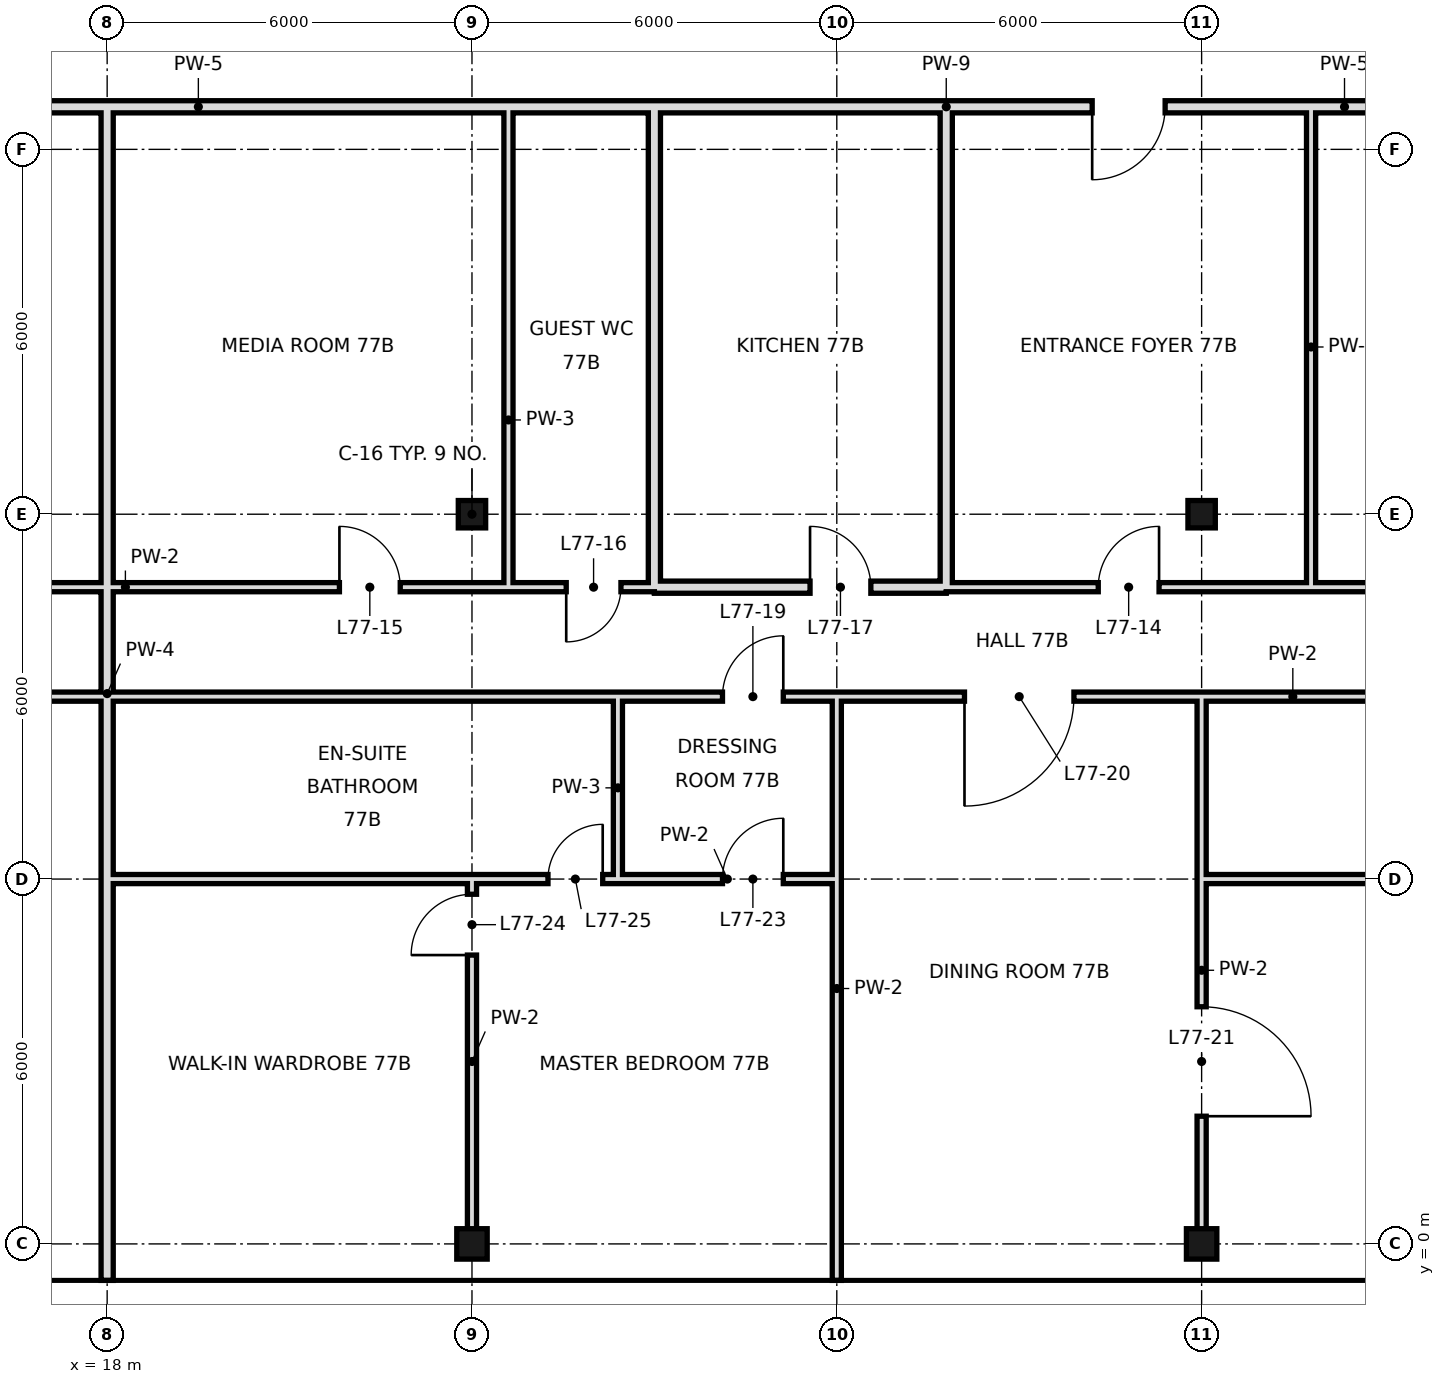
"""IFC4 building model, lengths in metres.
Left out: names, types, materials, properties, quantities, classifications, styles, units other than length and angle.
Written with IfcOpenShell. Run it as: python <this file> out.ifc"""

import sys

from ifc_helpers import new_model, si_unit, direction, frame, frame_2d, origin, origin_2d, place, context, subcontext, project, spatial, rectangle, hollow_rectangle, extrude, element, fill, save


model = new_model("IFC4")
c1 = context("Model", 3, precision=1e-05, world=origin(), true_north=direction((0.0, 1.0)))
c2 = subcontext(c1, "Body", "Model", "MODEL_VIEW")
j1 = project(units=[si_unit("LENGTHUNIT", "METRE"), si_unit("PLANEANGLEUNIT", "RADIAN")], contexts=[c1])
p1 = place(None, origin())
s1 = spatial("IfcSite", under=j1, at=p1, CompositionType="ELEMENT")
p2 = place(p1, origin())
s2 = spatial("IfcBuilding", under=s1, at=p2, CompositionType="ELEMENT")
p3 = place(p2, frame((0.0, 0.0, 323.2)))
s3 = spatial("IfcBuildingStorey", under=s2, at=p3, CompositionType="ELEMENT", Elevation=323.2)
p4 = place(p3, frame((24.0, 0.0, 0.0), z_axis=(0.0, 0.0, 1.0), x_axis=(1.0, 0.0, 0.0)))
e1 = element("IfcColumn", 1, at=p4, inside=s3, PredefinedType="COLUMN", context=c2, shape_type="SweptSolid", body=[
    extrude(hollow_rectangle(XDim=0.5, YDim=0.5, WallThickness=0.025, at=origin_2d()), origin(), (0.0, 0.0, 1.0), 3.6),
])
p5 = place(p3, frame((24.0, 12.0, 0.0), z_axis=(0.0, 0.0, 1.0), x_axis=(1.0, 0.0, 0.0)))
e2 = element("IfcColumn", 2, at=p5, inside=s3, PredefinedType="COLUMN", context=c2, shape_type="SweptSolid", body=[
    extrude(hollow_rectangle(XDim=0.45, YDim=0.45, WallThickness=0.022, at=origin_2d()), origin(), (0.0, 0.0, 1.0), 3.6),
])
p6 = place(p3, frame((36.0, 0.0, 0.0), z_axis=(0.0, 0.0, 1.0), x_axis=(1.0, 0.0, 0.0)))
e3 = element("IfcColumn", 3, at=p6, inside=s3, PredefinedType="COLUMN", context=c2, shape_type="SweptSolid", body=[
    extrude(hollow_rectangle(XDim=0.5, YDim=0.5, WallThickness=0.025, at=origin_2d()), origin(), (0.0, 0.0, 1.0), 3.6),
])
p7 = place(p3, frame((36.0, 12.0, 0.0), z_axis=(0.0, 0.0, 1.0), x_axis=(1.0, 0.0, 0.0)))
e4 = element("IfcColumn", 4, at=p7, inside=s3, PredefinedType="COLUMN", context=c2, shape_type="SweptSolid", body=[
    extrude(hollow_rectangle(XDim=0.45, YDim=0.45, WallThickness=0.022, at=origin_2d()), origin(), (0.0, 0.0, 1.0), 3.6),
])
p8 = place(p3, frame((18.0, -0.6, 0.0), z_axis=(0.0, 0.0, 1.0), x_axis=(0.0, 1.0, 0.0)))
e5 = element("IfcWall", 5, at=p8, inside=s3, PredefinedType="SOLIDWALL", context=c2, shape_type="SweptSolid", body=[
    extrude(rectangle(XDim=19.3, YDim=0.2, at=frame_2d((9.65, 0.0))), origin(), (0.0, 0.0, 1.0), 2.72),
])
p9 = place(p3, frame((24.0, 0.0, 0.0), z_axis=(0.0, 0.0, 1.0), x_axis=(0.0, 1.0, 0.0)))
e6 = element("IfcWall", 6, at=p9, inside=s3, PredefinedType="PARTITIONING", context=c2, shape_type="SweptSolid", body=[
    extrude(rectangle(XDim=6.0, YDim=0.15, at=frame_2d((3.0, 0.0))), origin(), (0.0, 0.0, 1.0), 2.72),
])
p10 = place(p9, frame((4.75, 0.0, 0.0)))
e7 = element("IfcOpeningElement", 7, at=p10, cuts=e6, PredefinedType="OPENING", context=c2, shape_type="SweptSolid", body=[
    extrude(rectangle(XDim=1.0, YDim=2.4, at=frame_2d((0.5, 1.2))), frame((0.0, 0.085, 0.0), z_axis=(0.0, -1.0, 0.0), x_axis=(1.0, 0.0, 0.0)), (0.0, 0.0, 1.0), 0.17),
])
p11 = place(p3, frame((24.6, 10.8, 0.0), z_axis=(0.0, 0.0, 1.0), x_axis=(0.0, 1.0, 0.0)))
e8 = element("IfcWall", 8, at=p11, inside=s3, PredefinedType="PARTITIONING", context=c2, shape_type="SweptSolid", body=[
    extrude(rectangle(XDim=7.9, YDim=0.15, at=frame_2d((3.95, 0.0))), origin(), (0.0, 0.0, 1.0), 3.42),
])
p12 = place(p3, frame((26.4, 6.0, 0.0), z_axis=(0.0, 0.0, 1.0), x_axis=(0.0, 1.0, 0.0)))
e9 = element("IfcWall", 9, at=p12, inside=s3, PredefinedType="PARTITIONING", context=c2, shape_type="SweptSolid", body=[
    extrude(rectangle(XDim=3.0, YDim=0.15, at=frame_2d((1.5, 0.0))), origin(), (0.0, 0.0, 1.0), 3.42),
])
p13 = place(p3, frame((27.0, 10.8, 0.0), z_axis=(0.0, 0.0, 1.0), x_axis=(0.0, 1.0, 0.0)))
e10 = element("IfcWall", 10, at=p13, inside=s3, PredefinedType="SOLIDWALL", context=c2, shape_type="SweptSolid", body=[
    extrude(rectangle(XDim=7.9, YDim=0.2, at=frame_2d((3.95, 0.0))), origin(), (0.0, 0.0, 1.0), 2.72),
])
p14 = place(p3, frame((30.0, -0.6, 0.0), z_axis=(0.0, 0.0, 1.0), x_axis=(0.0, 1.0, 0.0)))
e11 = element("IfcWall", 11, at=p14, inside=s3, PredefinedType="PARTITIONING", context=c2, shape_type="SweptSolid", body=[
    extrude(rectangle(XDim=9.6, YDim=0.15, at=frame_2d((4.8, 0.0))), origin(), (0.0, 0.0, 1.0), 2.72),
])
p15 = place(p3, frame((31.8, 10.8, 0.0), z_axis=(0.0, 0.0, 1.0), x_axis=(0.0, 1.0, 0.0)))
e12 = element("IfcWall", 12, at=p15, inside=s3, PredefinedType="SOLIDWALL", context=c2, shape_type="SweptSolid", body=[
    extrude(rectangle(XDim=7.9, YDim=0.2, at=frame_2d((3.95, 0.0))), origin(), (0.0, 0.0, 1.0), 3.42),
])
p16 = place(p3, frame((36.0, 0.0, 0.0), z_axis=(0.0, 0.0, 1.0), x_axis=(0.0, 1.0, 0.0)))
e13 = element("IfcWall", 13, at=p16, inside=s3, PredefinedType="PARTITIONING", context=c2, shape_type="SweptSolid", body=[
    extrude(rectangle(XDim=9.0, YDim=0.15, at=frame_2d((4.5, 0.0))), origin(), (0.0, 0.0, 1.0), 2.72),
])
p17 = place(p16, frame((2.1, 0.0, 0.0)))
e14 = element("IfcOpeningElement", 14, at=p17, cuts=e13, PredefinedType="OPENING", context=c2, shape_type="SweptSolid", body=[
    extrude(rectangle(XDim=1.8, YDim=2.4, at=frame_2d((0.9, 1.2))), frame((0.0, 0.085, 0.0), z_axis=(0.0, -1.0, 0.0), x_axis=(1.0, 0.0, 0.0)), (0.0, 0.0, 1.0), 0.17),
])
p18 = place(p3, frame((37.8, 10.8, 0.0), z_axis=(0.0, 0.0, 1.0), x_axis=(0.0, 1.0, 0.0)))
e15 = element("IfcWall", 15, at=p18, inside=s3, PredefinedType="PARTITIONING", context=c2, shape_type="SweptSolid", body=[
    extrude(rectangle(XDim=7.9, YDim=0.15, at=frame_2d((3.95, 0.0))), origin(), (0.0, 0.0, 1.0), 3.42),
])
p19 = place(p3, frame((27.0, 10.8, 0.0), z_axis=(0.0, 0.0, 1.0), x_axis=(1.0, 0.0, 0.0)))
e16 = element("IfcWall", 16, at=p19, inside=s3, PredefinedType="SOLIDWALL", context=c2, shape_type="SweptSolid", body=[
    extrude(rectangle(XDim=4.8, YDim=0.2, at=frame_2d((2.4, 0.0))), origin(), (0.0, 0.0, 1.0), 2.72),
])
p20 = place(p19, frame((2.56, 0.0, 0.0)))
e17 = element("IfcOpeningElement", 17, at=p20, cuts=e16, PredefinedType="OPENING", context=c2, shape_type="SweptSolid", body=[
    extrude(rectangle(XDim=1.0, YDim=2.4, at=frame_2d((0.5, 1.2))), frame((0.0, 0.11, 0.0), z_axis=(0.0, -1.0, 0.0), x_axis=(1.0, 0.0, 0.0)), (0.0, 0.0, 1.0), 0.22),
])
p21 = place(p3, frame((12.0, 10.8, 0.0), z_axis=(0.0, 0.0, 1.0), x_axis=(1.0, 0.0, 0.0)))
e18 = element("IfcWall", 18, at=p21, inside=s3, PredefinedType="PARTITIONING", context=c2, shape_type="SweptSolid", body=[
    extrude(rectangle(XDim=12.6, YDim=0.15, at=frame_2d((6.3, 0.0))), origin(), (0.0, 0.0, 1.0), 3.42),
])
p22 = place(p21, frame((2.5, 0.0, 0.0)))
e19 = element("IfcOpeningElement", 19, at=p22, cuts=e18, PredefinedType="OPENING", context=c2, shape_type="SweptSolid", body=[
    extrude(rectangle(XDim=1.0, YDim=2.4, at=frame_2d((0.5, 1.2))), frame((0.0, 0.085, 0.0), z_axis=(0.0, -1.0, 0.0), x_axis=(1.0, 0.0, 0.0)), (0.0, 0.0, 1.0), 0.17),
])
p23 = place(p21, frame((9.82, 0.0, 0.0)))
e20 = element("IfcOpeningElement", 20, at=p23, cuts=e18, PredefinedType="OPENING", context=c2, shape_type="SweptSolid", body=[
    extrude(rectangle(XDim=1.0, YDim=2.4, at=frame_2d((0.5, 1.2))), frame((0.0, 0.085, 0.0), z_axis=(0.0, -1.0, 0.0), x_axis=(1.0, 0.0, 0.0)), (0.0, 0.0, 1.0), 0.17),
])
p24 = place(p3, frame((31.8, 10.8, 0.0), z_axis=(0.0, 0.0, 1.0), x_axis=(1.0, 0.0, 0.0)))
e21 = element("IfcWall", 21, at=p24, inside=s3, PredefinedType="PARTITIONING", context=c2, shape_type="SweptSolid", body=[
    extrude(rectangle(XDim=16.8, YDim=0.15, at=frame_2d((8.4, 0.0))), origin(), (0.0, 0.0, 1.0), 3.42),
])
p25 = place(p24, frame((2.5, 0.0, 0.0)))
e22 = element("IfcOpeningElement", 22, at=p25, cuts=e21, PredefinedType="OPENING", context=c2, shape_type="SweptSolid", body=[
    extrude(rectangle(XDim=1.0, YDim=2.4, at=frame_2d((0.5, 1.2))), frame((0.0, 0.085, 0.0), z_axis=(0.0, -1.0, 0.0), x_axis=(1.0, 0.0, 0.0)), (0.0, 0.0, 1.0), 0.17),
])
p26 = place(p24, frame((12.34, 0.0, 0.0)))
e23 = element("IfcOpeningElement", 23, at=p26, cuts=e21, PredefinedType="OPENING", context=c2, shape_type="SweptSolid", body=[
    extrude(rectangle(XDim=1.0, YDim=2.4, at=frame_2d((0.5, 1.2))), frame((0.0, 0.085, 0.0), z_axis=(0.0, -1.0, 0.0), x_axis=(1.0, 0.0, 0.0)), (0.0, 0.0, 1.0), 0.17),
])
p27 = place(p3, frame((24.6, 10.8, 0.0), z_axis=(0.0, 0.0, 1.0), x_axis=(1.0, 0.0, 0.0)))
e24 = element("IfcWall", 24, at=p27, inside=s3, PredefinedType="PARTITIONING", context=c2, shape_type="SweptSolid", body=[
    extrude(rectangle(XDim=2.4, YDim=0.15, at=frame_2d((1.2, 0.0))), origin(), (0.0, 0.0, 1.0), 3.42),
])
p28 = place(p27, frame((0.95, 0.0, 0.0)))
e25 = element("IfcOpeningElement", 25, at=p28, cuts=e24, PredefinedType="OPENING", context=c2, shape_type="SweptSolid", body=[
    extrude(rectangle(XDim=0.9, YDim=2.4, at=frame_2d((0.45, 1.2))), frame((0.0, 0.085, 0.0), z_axis=(0.0, -1.0, 0.0), x_axis=(1.0, 0.0, 0.0)), (0.0, 0.0, 1.0), 0.17),
])
p29 = place(p3, frame((12.0, 18.7, 0.0), z_axis=(0.0, 0.0, 1.0), x_axis=(1.0, 0.0, 0.0)))
e26 = element("IfcWall", 26, at=p29, inside=s3, PredefinedType="SOLIDWALL", context=c2, shape_type="SweptSolid", body=[
    extrude(rectangle(XDim=15.0, YDim=0.2, at=frame_2d((7.5, 0.0))), origin(), (0.0, 0.0, 1.0), 2.72),
])
p30 = place(p29, frame((3.26, 0.0, 0.0)))
e27 = element("IfcOpeningElement", 27, at=p30, cuts=e26, PredefinedType="OPENING", context=c2, shape_type="SweptSolid", body=[
    extrude(rectangle(XDim=1.2, YDim=2.4, at=frame_2d((0.6, 1.2))), frame((0.0, 0.11, 0.0), z_axis=(0.0, -1.0, 0.0), x_axis=(1.0, 0.0, 0.0)), (0.0, 0.0, 1.0), 0.22),
])
p31 = place(p3, frame((31.8, 18.7, 0.0), z_axis=(0.0, 0.0, 1.0), x_axis=(1.0, 0.0, 0.0)))
e28 = element("IfcWall", 28, at=p31, inside=s3, PredefinedType="SOLIDWALL", context=c2, shape_type="SweptSolid", body=[
    extrude(rectangle(XDim=13.1, YDim=0.2, at=frame_2d((6.55, 0.0))), origin(), (0.0, 0.0, 1.0), 2.72),
])
p32 = place(p31, frame((2.4, 0.0, 0.0)))
e29 = element("IfcOpeningElement", 29, at=p32, cuts=e28, PredefinedType="OPENING", context=c2, shape_type="SweptSolid", body=[
    extrude(rectangle(XDim=1.2, YDim=2.4, at=frame_2d((0.6, 1.2))), frame((0.0, 0.11, 0.0), z_axis=(0.0, -1.0, 0.0), x_axis=(1.0, 0.0, 0.0)), (0.0, 0.0, 1.0), 0.22),
])
p33 = place(p3, frame((27.0, 18.7, 0.0), z_axis=(0.0, 0.0, 1.0), x_axis=(1.0, 0.0, 0.0)))
e30 = element("IfcWall", 30, at=p33, inside=s3, PredefinedType="SOLIDWALL", context=c2, shape_type="SweptSolid", body=[
    extrude(rectangle(XDim=4.8, YDim=0.2, at=frame_2d((2.4, 0.0))), origin(), (0.0, 0.0, 1.0), 2.72),
])
p34 = place(p3, frame((26.4, 6.0, 0.0), z_axis=(0.0, 0.0, 1.0), x_axis=(1.0, 0.0, 0.0)))
e31 = element("IfcWall", 31, at=p34, inside=s3, PredefinedType="PARTITIONING", context=c2, shape_type="SweptSolid", body=[
    extrude(rectangle(XDim=3.6, YDim=0.15, at=frame_2d((1.8, 0.0))), origin(), (0.0, 0.0, 1.0), 2.97),
])
p35 = place(p34, frame((1.72, 0.0, 0.0)))
e32 = element("IfcOpeningElement", 32, at=p35, cuts=e31, PredefinedType="OPENING", context=c2, shape_type="SweptSolid", body=[
    extrude(rectangle(XDim=1.0, YDim=2.4, at=frame_2d((0.5, 1.2))), frame((0.0, 0.085, 0.0), z_axis=(0.0, -1.0, 0.0), x_axis=(1.0, 0.0, 0.0)), (0.0, 0.0, 1.0), 0.17),
])
p36 = place(p3, frame((36.0, 6.0, 0.0), z_axis=(0.0, 0.0, 1.0), x_axis=(1.0, 0.0, 0.0)))
e33 = element("IfcWall", 33, at=p36, inside=s3, PredefinedType="PARTITIONING", context=c2, shape_type="SweptSolid", body=[
    extrude(rectangle(XDim=12.0, YDim=0.15, at=frame_2d((6.0, 0.0))), origin(), (0.0, 0.0, 1.0), 2.97),
])
p37 = place(p3, frame((18.0, 6.0, 0.0), z_axis=(0.0, 0.0, 1.0), x_axis=(1.0, 0.0, 0.0)))
e34 = element("IfcWall", 34, at=p37, inside=s3, PredefinedType="PARTITIONING", context=c2, shape_type="SweptSolid", body=[
    extrude(rectangle(XDim=8.4, YDim=0.15, at=frame_2d((4.2, 0.0))), origin(), (0.0, 0.0, 1.0), 2.97),
])
p38 = place(p37, frame((7.25, 0.0, 0.0)))
e35 = element("IfcOpeningElement", 35, at=p38, cuts=e34, PredefinedType="OPENING", context=c2, shape_type="SweptSolid", body=[
    extrude(rectangle(XDim=0.9, YDim=2.4, at=frame_2d((0.45, 1.2))), frame((0.0, 0.085, 0.0), z_axis=(0.0, -1.0, 0.0), x_axis=(1.0, 0.0, 0.0)), (0.0, 0.0, 1.0), 0.17),
])
p39 = place(p3, frame((12.0, 9.0, 0.0), z_axis=(0.0, 0.0, 1.0), x_axis=(1.0, 0.0, 0.0)))
e36 = element("IfcWall", 36, at=p39, inside=s3, PredefinedType="PARTITIONING", context=c2, shape_type="SweptSolid", body=[
    extrude(rectangle(XDim=6.0, YDim=0.15, at=frame_2d((3.0, 0.0))), origin(), (0.0, 0.0, 1.0), 3.42),
])
p40 = place(p39, frame((2.1, 0.0, 0.0)))
e37 = element("IfcOpeningElement", 37, at=p40, cuts=e36, PredefinedType="OPENING", context=c2, shape_type="SweptSolid", body=[
    extrude(rectangle(XDim=1.8, YDim=2.4, at=frame_2d((0.9, 1.2))), frame((0.0, 0.085, 0.0), z_axis=(0.0, -1.0, 0.0), x_axis=(1.0, 0.0, 0.0)), (0.0, 0.0, 1.0), 0.17),
])
p41 = place(p3, frame((26.4, 9.0, 0.0), z_axis=(0.0, 0.0, 1.0), x_axis=(1.0, 0.0, 0.0)))
e38 = element("IfcWall", 38, at=p41, inside=s3, PredefinedType="PARTITIONING", context=c2, shape_type="SweptSolid", body=[
    extrude(rectangle(XDim=22.2, YDim=0.15, at=frame_2d((11.1, 0.0))), origin(), (0.0, 0.0, 1.0), 3.42),
])
p42 = place(p41, frame((1.72, 0.0, 0.0)))
e39 = element("IfcOpeningElement", 39, at=p42, cuts=e38, PredefinedType="OPENING", context=c2, shape_type="SweptSolid", body=[
    extrude(rectangle(XDim=1.0, YDim=2.4, at=frame_2d((0.5, 1.2))), frame((0.0, 0.085, 0.0), z_axis=(0.0, -1.0, 0.0), x_axis=(1.0, 0.0, 0.0)), (0.0, 0.0, 1.0), 0.17),
])
p43 = place(p41, frame((5.7, 0.0, 0.0)))
e40 = element("IfcOpeningElement", 40, at=p43, cuts=e38, PredefinedType="OPENING", context=c2, shape_type="SweptSolid", body=[
    extrude(rectangle(XDim=1.8, YDim=2.4, at=frame_2d((0.9, 1.2))), frame((0.0, 0.085, 0.0), z_axis=(0.0, -1.0, 0.0), x_axis=(1.0, 0.0, 0.0)), (0.0, 0.0, 1.0), 0.17),
])
p44 = place(p41, frame((12.76, 0.0, 0.0)))
e41 = element("IfcOpeningElement", 41, at=p44, cuts=e38, PredefinedType="OPENING", context=c2, shape_type="SweptSolid", body=[
    extrude(rectangle(XDim=1.8, YDim=2.4, at=frame_2d((0.9, 1.2))), frame((0.0, 0.085, 0.0), z_axis=(0.0, -1.0, 0.0), x_axis=(1.0, 0.0, 0.0)), (0.0, 0.0, 1.0), 0.17),
])
p45 = place(p3, frame((18.0, 9.0, 0.0), z_axis=(0.0, 0.0, 1.0), x_axis=(1.0, 0.0, 0.0)))
e42 = element("IfcWall", 42, at=p45, inside=s3, PredefinedType="PARTITIONING", context=c2, shape_type="SweptSolid", body=[
    extrude(rectangle(XDim=8.4, YDim=0.15, at=frame_2d((4.2, 0.0))), origin(), (0.0, 0.0, 1.0), 3.42),
])
p46 = place(p25, frame((1.0, 0.0, 0.0), z_axis=(0.0, 0.0, 1.0), x_axis=(-1.0, 0.0, 0.0)))
e43 = element("IfcDoor", 43, at=p46, inside=s3, OperationType="SINGLE_SWING_LEFT", PredefinedType="DOOR", context=c2, shape_type="SweptSolid", body=[
    extrude(rectangle(XDim=1.0, YDim=2.4, at=frame_2d((0.5, 1.2))), frame((0.0, 0.025, 0.0), z_axis=(0.0, -1.0, 0.0), x_axis=(1.0, 0.0, 0.0)), (0.0, 0.0, 1.0), 0.05),
])
fill(e22, e43)
p47 = place(p23, origin())
e44 = element("IfcDoor", 44, at=p47, inside=s3, OperationType="SINGLE_SWING_LEFT", PredefinedType="DOOR", context=c2, shape_type="SweptSolid", body=[
    extrude(rectangle(XDim=1.0, YDim=2.4, at=frame_2d((0.5, 1.2))), frame((0.0, 0.025, 0.0), z_axis=(0.0, -1.0, 0.0), x_axis=(1.0, 0.0, 0.0)), (0.0, 0.0, 1.0), 0.05),
])
fill(e20, e44)
p48 = place(p28, frame((0.9, 0.0, 0.0), z_axis=(0.0, 0.0, 1.0), x_axis=(-1.0, 0.0, 0.0)))
e45 = element("IfcDoor", 45, at=p48, inside=s3, OperationType="SINGLE_SWING_RIGHT", PredefinedType="DOOR", context=c2, shape_type="SweptSolid", body=[
    extrude(rectangle(XDim=0.9, YDim=2.4, at=frame_2d((0.45, 1.2))), frame((0.0, 0.025, 0.0), z_axis=(0.0, -1.0, 0.0), x_axis=(1.0, 0.0, 0.0)), (0.0, 0.0, 1.0), 0.05),
])
fill(e25, e45)
p49 = place(p20, origin())
e46 = element("IfcDoor", 46, at=p49, inside=s3, OperationType="SINGLE_SWING_LEFT", PredefinedType="DOOR", context=c2, shape_type="SweptSolid", body=[
    extrude(rectangle(XDim=1.0, YDim=2.4, at=frame_2d((0.5, 1.2))), frame((0.0, 0.025, 0.0), z_axis=(0.0, -1.0, 0.0), x_axis=(1.0, 0.0, 0.0)), (0.0, 0.0, 1.0), 0.05),
])
fill(e17, e46)
p50 = place(p42, frame((1.0, 0.0, 0.0), z_axis=(0.0, 0.0, 1.0), x_axis=(-1.0, 0.0, 0.0)))
e47 = element("IfcDoor", 47, at=p50, inside=s3, OperationType="SINGLE_SWING_LEFT", PredefinedType="DOOR", context=c2, shape_type="SweptSolid", body=[
    extrude(rectangle(XDim=1.0, YDim=2.4, at=frame_2d((0.5, 1.2))), frame((0.0, 0.025, 0.0), z_axis=(0.0, -1.0, 0.0), x_axis=(1.0, 0.0, 0.0)), (0.0, 0.0, 1.0), 0.05),
])
fill(e39, e47)
p51 = place(p43, frame((1.8, 0.0, 0.0), z_axis=(0.0, 0.0, 1.0), x_axis=(-1.0, 0.0, 0.0)))
e48 = element("IfcDoor", 48, at=p51, inside=s3, OperationType="SINGLE_SWING_RIGHT", PredefinedType="DOOR", context=c2, shape_type="SweptSolid", body=[
    extrude(rectangle(XDim=1.8, YDim=2.4, at=frame_2d((0.9, 1.2))), frame((0.0, 0.025, 0.0), z_axis=(0.0, -1.0, 0.0), x_axis=(1.0, 0.0, 0.0)), (0.0, 0.0, 1.0), 0.05),
])
fill(e40, e48)
p52 = place(p17, frame((1.8, 0.0, 0.0), z_axis=(0.0, 0.0, 1.0), x_axis=(-1.0, 0.0, 0.0)))
e49 = element("IfcDoor", 49, at=p52, inside=s3, OperationType="SINGLE_SWING_RIGHT", PredefinedType="DOOR", context=c2, shape_type="SweptSolid", body=[
    extrude(rectangle(XDim=1.8, YDim=2.4, at=frame_2d((0.9, 1.2))), frame((0.0, 0.025, 0.0), z_axis=(0.0, -1.0, 0.0), x_axis=(1.0, 0.0, 0.0)), (0.0, 0.0, 1.0), 0.05),
])
fill(e14, e49)
p53 = place(p35, frame((1.0, 0.0, 0.0), z_axis=(0.0, 0.0, 1.0), x_axis=(-1.0, 0.0, 0.0)))
e50 = element("IfcDoor", 50, at=p53, inside=s3, OperationType="SINGLE_SWING_LEFT", PredefinedType="DOOR", context=c2, shape_type="SweptSolid", body=[
    extrude(rectangle(XDim=1.0, YDim=2.4, at=frame_2d((0.5, 1.2))), frame((0.0, 0.025, 0.0), z_axis=(0.0, -1.0, 0.0), x_axis=(1.0, 0.0, 0.0)), (0.0, 0.0, 1.0), 0.05),
])
fill(e32, e50)
p54 = place(p10, origin())
e51 = element("IfcDoor", 51, at=p54, inside=s3, OperationType="SINGLE_SWING_LEFT", PredefinedType="DOOR", context=c2, shape_type="SweptSolid", body=[
    extrude(rectangle(XDim=1.0, YDim=2.4, at=frame_2d((0.5, 1.2))), frame((0.0, 0.025, 0.0), z_axis=(0.0, -1.0, 0.0), x_axis=(1.0, 0.0, 0.0)), (0.0, 0.0, 1.0), 0.05),
])
fill(e7, e51)
p55 = place(p38, frame((0.9, 0.0, 0.0), z_axis=(0.0, 0.0, 1.0), x_axis=(-1.0, 0.0, 0.0)))
e52 = element("IfcDoor", 52, at=p55, inside=s3, OperationType="SINGLE_SWING_LEFT", PredefinedType="DOOR", context=c2, shape_type="SweptSolid", body=[
    extrude(rectangle(XDim=0.9, YDim=2.4, at=frame_2d((0.45, 1.2))), frame((0.0, 0.025, 0.0), z_axis=(0.0, -1.0, 0.0), x_axis=(1.0, 0.0, 0.0)), (0.0, 0.0, 1.0), 0.05),
])
fill(e35, e52)
p56 = place(p32, frame((1.2, 0.0, 0.0), z_axis=(0.0, 0.0, 1.0), x_axis=(-1.0, 0.0, 0.0)))
e53 = element("IfcDoor", 53, at=p56, inside=s3, OperationType="SINGLE_SWING_RIGHT", PredefinedType="DOOR", context=c2, shape_type="SweptSolid", body=[
    extrude(rectangle(XDim=1.2, YDim=2.4, at=frame_2d((0.6, 1.2))), frame((0.0, 0.025, 0.0), z_axis=(0.0, -1.0, 0.0), x_axis=(1.0, 0.0, 0.0)), (0.0, 0.0, 1.0), 0.05),
])
fill(e29, e53)
save(model, sys.argv[1])
